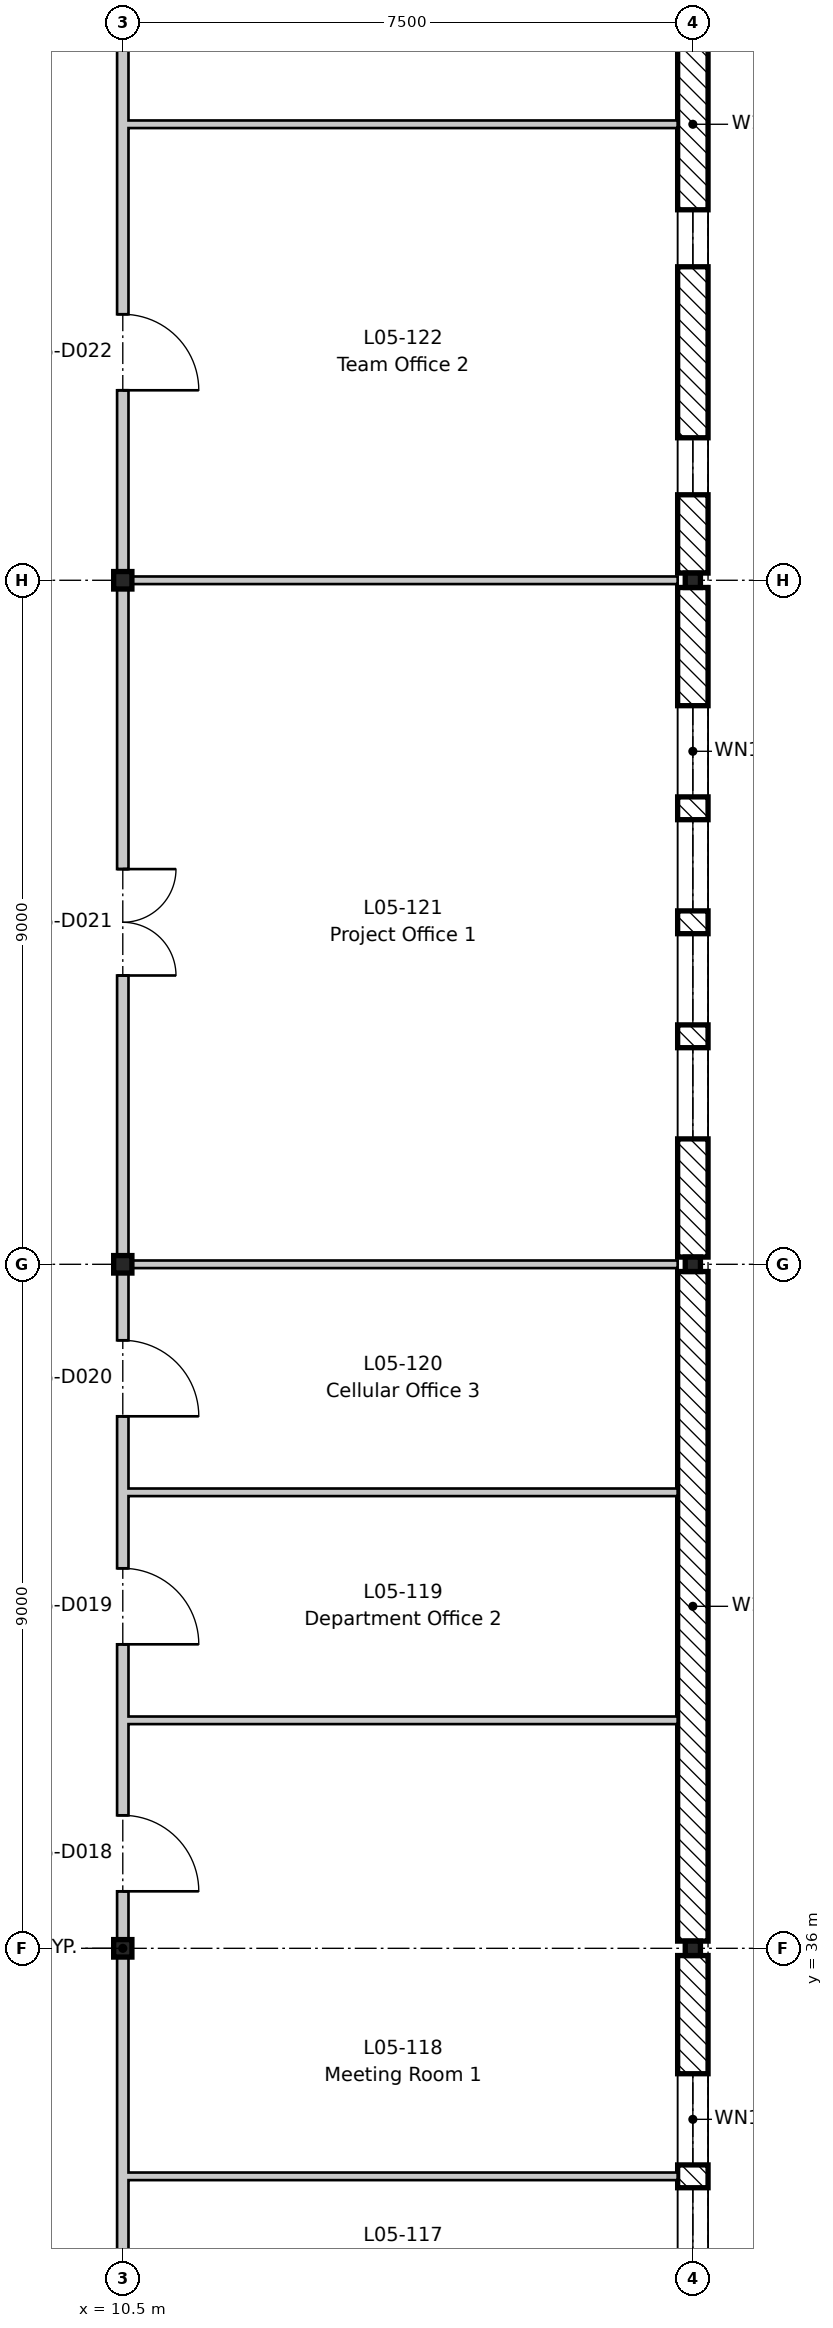
"""IFC4 building model, lengths in metres.
Left out: names, types, materials, properties, quantities, classifications, styles, units other than length and angle.
Written with IfcOpenShell. Run it as: python <this file> out.ifc"""

import sys

from ifc_helpers import new_model, si_unit, direction, frame, frame_2d, origin, origin_2d, place, context, subcontext, project, spatial, rectangle, i_section, extrude, element, fill, save


model = new_model("IFC4")
c1 = context("Model", 3, precision=1e-05, world=origin(), true_north=direction((0.0, 1.0)))
c2 = subcontext(c1, "Body", "Model", "MODEL_VIEW")
j1 = project(units=[si_unit("LENGTHUNIT", "METRE"), si_unit("PLANEANGLEUNIT", "RADIAN")], contexts=[c1])
p1 = place(None, origin())
s1 = spatial("IfcSite", under=j1, at=p1, CompositionType="ELEMENT")
p2 = place(p1, origin())
s2 = spatial("IfcBuilding", under=s1, at=p2, CompositionType="ELEMENT")
p3 = place(p2, frame((0.0, 0.0, 22.8)))
s3 = spatial("IfcBuildingStorey", under=s2, at=p3, CompositionType="ELEMENT", Elevation=22.8)
for number, where, z_axis, x_axis in (
    (1, (10.5, 36.0, -0.2), (0.0, 0.0, 1.0), (1.0, 0.0, 0.0)),
    (2, (10.5, 45.0, -0.2), (0.0, 0.0, 1.0), (1.0, 0.0, 0.0)),
    (3, (10.5, 54.0, -0.2), (0.0, 0.0, 1.0), (1.0, 0.0, 0.0)),
):
    element("IfcColumn", number, at=place(p3, frame(where, z_axis=z_axis, x_axis=x_axis)), inside=s3, PredefinedType="COLUMN", context=c2, shape_type="SweptSolid", body=[
        extrude(i_section(OverallWidth=0.24, OverallDepth=0.23, WebThickness=0.008, FlangeThickness=0.012, FilletRadius=0.021, at=origin_2d()), origin(), (0.0, 0.0, 1.0), 4.15),
    ])
for number, where, z_axis, x_axis in (
    (4, (18.0, 36.0, -0.2), (0.0, 0.0, 1.0), (1.0, 0.0, 0.0)),
    (5, (18.0, 45.0, -0.2), (0.0, 0.0, 1.0), (1.0, 0.0, 0.0)),
    (6, (18.0, 54.0, -0.2), (0.0, 0.0, 1.0), (1.0, 0.0, 0.0)),
):
    element("IfcColumn", number, at=place(p3, frame(where, z_axis=z_axis, x_axis=x_axis)), inside=s3, PredefinedType="COLUMN", context=c2, shape_type="SweptSolid", body=[
        extrude(i_section(OverallWidth=0.2, OverallDepth=0.19, WebThickness=0.007, FlangeThickness=0.01, FilletRadius=0.018, at=origin_2d()), origin(), (0.0, 0.0, 1.0), 4.15),
    ])
p4 = place(p3, frame((18.0, 35.905, 0.0), z_axis=(0.0, 0.0, 1.0), x_axis=(0.0, -1.0, 0.0)))
e7 = element("IfcWall", 7, at=p4, inside=s3, PredefinedType="STANDARD", context=c2, shape_type="SweptSolid", body=[
    extrude(rectangle(XDim=8.81, YDim=0.4, at=frame_2d((4.405, 0.0))), origin(), (0.0, 0.0, 1.0), 3.55),
])
p5 = place(p4, frame((6.055, 0.0, 0.6)))
e8 = element("IfcOpeningElement", 8, at=p5, cuts=e7, PredefinedType="OPENING", context=c2, shape_type="SweptSolid", body=[
    extrude(rectangle(XDim=1.2, YDim=1.8, at=frame_2d((0.6, 0.9))), frame((0.0, 0.21, 0.0), z_axis=(0.0, -1.0, 0.0), x_axis=(1.0, 0.0, 0.0)), (0.0, 0.0, 1.0), 0.42),
])
p6 = place(p4, frame((4.555, 0.0, 0.6)))
e9 = element("IfcOpeningElement", 9, at=p6, cuts=e7, PredefinedType="OPENING", context=c2, shape_type="SweptSolid", body=[
    extrude(rectangle(XDim=1.2, YDim=1.8, at=frame_2d((0.6, 0.9))), frame((0.0, 0.21, 0.0), z_axis=(0.0, -1.0, 0.0), x_axis=(1.0, 0.0, 0.0)), (0.0, 0.0, 1.0), 0.42),
])
p7 = place(p4, frame((3.055, 0.0, 0.6)))
e10 = element("IfcOpeningElement", 10, at=p7, cuts=e7, PredefinedType="OPENING", context=c2, shape_type="SweptSolid", body=[
    extrude(rectangle(XDim=1.2, YDim=1.8, at=frame_2d((0.6, 0.9))), frame((0.0, 0.21, 0.0), z_axis=(0.0, -1.0, 0.0), x_axis=(1.0, 0.0, 0.0)), (0.0, 0.0, 1.0), 0.42),
])
p8 = place(p4, frame((1.555, 0.0, 0.6)))
e11 = element("IfcOpeningElement", 11, at=p8, cuts=e7, PredefinedType="OPENING", context=c2, shape_type="SweptSolid", body=[
    extrude(rectangle(XDim=1.2, YDim=1.8, at=frame_2d((0.6, 0.9))), frame((0.0, 0.21, 0.0), z_axis=(0.0, -1.0, 0.0), x_axis=(1.0, 0.0, 0.0)), (0.0, 0.0, 1.0), 0.42),
])
p9 = place(p3, frame((18.0, 44.905, 0.0), z_axis=(0.0, 0.0, 1.0), x_axis=(0.0, -1.0, 0.0)))
e12 = element("IfcWall", 12, at=p9, inside=s3, PredefinedType="STANDARD", context=c2, shape_type="SweptSolid", body=[
    extrude(rectangle(XDim=8.81, YDim=0.4, at=frame_2d((4.405, 0.0))), origin(), (0.0, 0.0, 1.0), 3.55),
])
p10 = place(p3, frame((18.0, 53.905, 0.0), z_axis=(0.0, 0.0, 1.0), x_axis=(0.0, -1.0, 0.0)))
e13 = element("IfcWall", 13, at=p10, inside=s3, PredefinedType="STANDARD", context=c2, shape_type="SweptSolid", body=[
    extrude(rectangle(XDim=8.81, YDim=0.4, at=frame_2d((4.405, 0.0))), origin(), (0.0, 0.0, 1.0), 3.55),
])
p11 = place(p10, frame((6.055, 0.0, 0.6)))
e14 = element("IfcOpeningElement", 14, at=p11, cuts=e13, PredefinedType="OPENING", context=c2, shape_type="SweptSolid", body=[
    extrude(rectangle(XDim=1.2, YDim=1.8, at=frame_2d((0.6, 0.9))), frame((0.0, 0.21, 0.0), z_axis=(0.0, -1.0, 0.0), x_axis=(1.0, 0.0, 0.0)), (0.0, 0.0, 1.0), 0.42),
])
p12 = place(p10, frame((4.555, 0.0, 0.6)))
e15 = element("IfcOpeningElement", 15, at=p12, cuts=e13, PredefinedType="OPENING", context=c2, shape_type="SweptSolid", body=[
    extrude(rectangle(XDim=1.2, YDim=1.8, at=frame_2d((0.6, 0.9))), frame((0.0, 0.21, 0.0), z_axis=(0.0, -1.0, 0.0), x_axis=(1.0, 0.0, 0.0)), (0.0, 0.0, 1.0), 0.42),
])
p13 = place(p10, frame((3.055, 0.0, 0.6)))
e16 = element("IfcOpeningElement", 16, at=p13, cuts=e13, PredefinedType="OPENING", context=c2, shape_type="SweptSolid", body=[
    extrude(rectangle(XDim=1.2, YDim=1.8, at=frame_2d((0.6, 0.9))), frame((0.0, 0.21, 0.0), z_axis=(0.0, -1.0, 0.0), x_axis=(1.0, 0.0, 0.0)), (0.0, 0.0, 1.0), 0.42),
])
p14 = place(p10, frame((1.555, 0.0, 0.6)))
e17 = element("IfcOpeningElement", 17, at=p14, cuts=e13, PredefinedType="OPENING", context=c2, shape_type="SweptSolid", body=[
    extrude(rectangle(XDim=1.2, YDim=1.8, at=frame_2d((0.6, 0.9))), frame((0.0, 0.21, 0.0), z_axis=(0.0, -1.0, 0.0), x_axis=(1.0, 0.0, 0.0)), (0.0, 0.0, 1.0), 0.42),
])
p15 = place(p3, frame((18.0, 62.905, 0.0), z_axis=(0.0, 0.0, 1.0), x_axis=(0.0, -1.0, 0.0)))
e18 = element("IfcWall", 18, at=p15, inside=s3, PredefinedType="STANDARD", context=c2, shape_type="SweptSolid", body=[
    extrude(rectangle(XDim=8.81, YDim=0.4, at=frame_2d((4.405, 0.0))), origin(), (0.0, 0.0, 1.0), 3.55),
])
p16 = place(p15, frame((7.03, 0.0, 1.5)))
e19 = element("IfcOpeningElement", 19, at=p16, cuts=e18, PredefinedType="OPENING", context=c2, shape_type="SweptSolid", body=[
    extrude(rectangle(XDim=0.75, YDim=1.2, at=frame_2d((0.375, 0.6))), frame((0.0, 0.21, 0.0), z_axis=(0.0, -1.0, 0.0), x_axis=(1.0, 0.0, 0.0)), (0.0, 0.0, 1.0), 0.42),
])
p17 = place(p15, frame((4.03, 0.0, 1.5)))
e20 = element("IfcOpeningElement", 20, at=p17, cuts=e18, PredefinedType="OPENING", context=c2, shape_type="SweptSolid", body=[
    extrude(rectangle(XDim=0.75, YDim=1.2, at=frame_2d((0.375, 0.6))), frame((0.0, 0.21, 0.0), z_axis=(0.0, -1.0, 0.0), x_axis=(1.0, 0.0, 0.0)), (0.0, 0.0, 1.0), 0.42),
])
p18 = place(p15, frame((1.03, 0.0, 1.5)))
e21 = element("IfcOpeningElement", 21, at=p18, cuts=e18, PredefinedType="OPENING", context=c2, shape_type="SweptSolid", body=[
    extrude(rectangle(XDim=0.75, YDim=1.2, at=frame_2d((0.375, 0.6))), frame((0.0, 0.21, 0.0), z_axis=(0.0, -1.0, 0.0), x_axis=(1.0, 0.0, 0.0)), (0.0, 0.0, 1.0), 0.42),
])
for number, where, z_axis, x_axis in (
    (22, (10.575, 33.0, 0.0), (0.0, 0.0, 1.0), (1.0, 0.0, 0.0)),
    (23, (10.575, 39.0, 0.0), (0.0, 0.0, 1.0), (1.0, 0.0, 0.0)),
    (24, (10.575, 42.0, 0.0), (0.0, 0.0, 1.0), (1.0, 0.0, 0.0)),
):
    element("IfcWall", number, at=place(p3, frame(where, z_axis=z_axis, x_axis=x_axis)), inside=s3, PredefinedType="PARTITIONING", context=c2, shape_type="SweptSolid", body=[
        extrude(rectangle(XDim=7.225, YDim=0.1, at=frame_2d((3.613, 0.0))), origin(), (0.0, 0.0, 1.0), 3.95),
    ])
for number, where, z_axis, x_axis in (
    (25, (10.575, 45.0, 0.0), (0.0, 0.0, 1.0), (1.0, 0.0, 0.0)),
    (26, (10.575, 54.0, 0.0), (0.0, 0.0, 1.0), (1.0, 0.0, 0.0)),
):
    element("IfcWall", number, at=place(p3, frame(where, z_axis=z_axis, x_axis=x_axis)), inside=s3, PredefinedType="PARTITIONING", context=c2, shape_type="SweptSolid", body=[
        extrude(rectangle(XDim=7.225, YDim=0.1, at=frame_2d((3.613, 0.0))), origin(), (0.0, 0.0, 1.0), 3.6),
    ])
p19 = place(p3, frame((10.575, 60.0, 0.0), z_axis=(0.0, 0.0, 1.0), x_axis=(1.0, 0.0, 0.0)))
e27 = element("IfcWall", 27, at=p19, inside=s3, PredefinedType="PARTITIONING", context=c2, shape_type="SweptSolid", body=[
    extrude(rectangle(XDim=7.225, YDim=0.1, at=frame_2d((3.613, 0.0))), origin(), (0.0, 0.0, 1.0), 3.95),
])
p20 = place(p3, frame((10.5, -8.8, 0.0), z_axis=(0.0, 0.0, 1.0), x_axis=(0.0, 1.0, 0.0)))
e28 = element("IfcWall", 28, at=p20, inside=s3, PredefinedType="PARTITIONING", context=c2, shape_type="SweptSolid", body=[
    extrude(rectangle(XDim=79.3, YDim=0.15, at=frame_2d((39.65, 0.0))), origin(), (0.0, 0.0, 1.0), 3.43),
])
p21 = place(p20, frame((3.6, 0.0, 0.0)))
e29 = element("IfcOpeningElement", 29, at=p21, cuts=e28, PredefinedType="OPENING", context=c2, shape_type="SweptSolid", body=[
    extrude(rectangle(XDim=1.4, YDim=2.1, at=frame_2d((0.7, 1.05))), frame((0.0, 0.085, 0.0), z_axis=(0.0, -1.0, 0.0), x_axis=(1.0, 0.0, 0.0)), (0.0, 0.0, 1.0), 0.17),
])
p22 = place(p20, frame((9.8, 0.0, 0.0)))
e30 = element("IfcOpeningElement", 30, at=p22, cuts=e28, PredefinedType="OPENING", context=c2, shape_type="SweptSolid", body=[
    extrude(rectangle(XDim=1.0, YDim=2.1, at=frame_2d((0.5, 1.05))), frame((0.0, 0.085, 0.0), z_axis=(0.0, -1.0, 0.0), x_axis=(1.0, 0.0, 0.0)), (0.0, 0.0, 1.0), 0.17),
])
p23 = place(p20, frame((14.3, 0.0, 0.0)))
e31 = element("IfcOpeningElement", 31, at=p23, cuts=e28, PredefinedType="OPENING", context=c2, shape_type="SweptSolid", body=[
    extrude(rectangle(XDim=1.0, YDim=2.1, at=frame_2d((0.5, 1.05))), frame((0.0, 0.085, 0.0), z_axis=(0.0, -1.0, 0.0), x_axis=(1.0, 0.0, 0.0)), (0.0, 0.0, 1.0), 0.17),
])
p24 = place(p20, frame((20.3, 0.0, 0.0)))
e32 = element("IfcOpeningElement", 32, at=p24, cuts=e28, PredefinedType="OPENING", context=c2, shape_type="SweptSolid", body=[
    extrude(rectangle(XDim=1.0, YDim=2.1, at=frame_2d((0.5, 1.05))), frame((0.0, 0.085, 0.0), z_axis=(0.0, -1.0, 0.0), x_axis=(1.0, 0.0, 0.0)), (0.0, 0.0, 1.0), 0.17),
])
p25 = place(p20, frame((27.6, 0.0, 0.0)))
e33 = element("IfcOpeningElement", 33, at=p25, cuts=e28, PredefinedType="OPENING", context=c2, shape_type="SweptSolid", body=[
    extrude(rectangle(XDim=1.4, YDim=2.1, at=frame_2d((0.7, 1.05))), frame((0.0, 0.085, 0.0), z_axis=(0.0, -1.0, 0.0), x_axis=(1.0, 0.0, 0.0)), (0.0, 0.0, 1.0), 0.17),
])
p26 = place(p20, frame((33.8, 0.0, 0.0)))
e34 = element("IfcOpeningElement", 34, at=p26, cuts=e28, PredefinedType="OPENING", context=c2, shape_type="SweptSolid", body=[
    extrude(rectangle(XDim=1.0, YDim=2.1, at=frame_2d((0.5, 1.05))), frame((0.0, 0.085, 0.0), z_axis=(0.0, -1.0, 0.0), x_axis=(1.0, 0.0, 0.0)), (0.0, 0.0, 1.0), 0.17),
])
p27 = place(p20, frame((36.8, 0.0, 0.0)))
e35 = element("IfcOpeningElement", 35, at=p27, cuts=e28, PredefinedType="OPENING", context=c2, shape_type="SweptSolid", body=[
    extrude(rectangle(XDim=1.0, YDim=2.1, at=frame_2d((0.5, 1.05))), frame((0.0, 0.085, 0.0), z_axis=(0.0, -1.0, 0.0), x_axis=(1.0, 0.0, 0.0)), (0.0, 0.0, 1.0), 0.17),
])
p28 = place(p20, frame((39.8, 0.0, 0.0)))
e36 = element("IfcOpeningElement", 36, at=p28, cuts=e28, PredefinedType="OPENING", context=c2, shape_type="SweptSolid", body=[
    extrude(rectangle(XDim=1.0, YDim=2.1, at=frame_2d((0.5, 1.05))), frame((0.0, 0.085, 0.0), z_axis=(0.0, -1.0, 0.0), x_axis=(1.0, 0.0, 0.0)), (0.0, 0.0, 1.0), 0.17),
])
p29 = place(p20, frame((45.55, 0.0, 0.0)))
e37 = element("IfcOpeningElement", 37, at=p29, cuts=e28, PredefinedType="OPENING", context=c2, shape_type="SweptSolid", body=[
    extrude(rectangle(XDim=1.0, YDim=2.1, at=frame_2d((0.5, 1.05))), frame((0.0, 0.085, 0.0), z_axis=(0.0, -1.0, 0.0), x_axis=(1.0, 0.0, 0.0)), (0.0, 0.0, 1.0), 0.17),
])
p30 = place(p20, frame((48.8, 0.0, 0.0)))
e38 = element("IfcOpeningElement", 38, at=p30, cuts=e28, PredefinedType="OPENING", context=c2, shape_type="SweptSolid", body=[
    extrude(rectangle(XDim=1.0, YDim=2.1, at=frame_2d((0.5, 1.05))), frame((0.0, 0.085, 0.0), z_axis=(0.0, -1.0, 0.0), x_axis=(1.0, 0.0, 0.0)), (0.0, 0.0, 1.0), 0.17),
])
p31 = place(p20, frame((51.8, 0.0, 0.0)))
e39 = element("IfcOpeningElement", 39, at=p31, cuts=e28, PredefinedType="OPENING", context=c2, shape_type="SweptSolid", body=[
    extrude(rectangle(XDim=1.0, YDim=2.1, at=frame_2d((0.5, 1.05))), frame((0.0, 0.085, 0.0), z_axis=(0.0, -1.0, 0.0), x_axis=(1.0, 0.0, 0.0)), (0.0, 0.0, 1.0), 0.17),
])
p32 = place(p20, frame((57.6, 0.0, 0.0)))
e40 = element("IfcOpeningElement", 40, at=p32, cuts=e28, PredefinedType="OPENING", context=c2, shape_type="SweptSolid", body=[
    extrude(rectangle(XDim=1.4, YDim=2.1, at=frame_2d((0.7, 1.05))), frame((0.0, 0.085, 0.0), z_axis=(0.0, -1.0, 0.0), x_axis=(1.0, 0.0, 0.0)), (0.0, 0.0, 1.0), 0.17),
])
p33 = place(p20, frame((65.3, 0.0, 0.0)))
e41 = element("IfcOpeningElement", 41, at=p33, cuts=e28, PredefinedType="OPENING", context=c2, shape_type="SweptSolid", body=[
    extrude(rectangle(XDim=1.0, YDim=2.1, at=frame_2d((0.5, 1.05))), frame((0.0, 0.085, 0.0), z_axis=(0.0, -1.0, 0.0), x_axis=(1.0, 0.0, 0.0)), (0.0, 0.0, 1.0), 0.17),
])
p34 = place(p20, frame((69.8, 0.0, 0.0)))
e42 = element("IfcOpeningElement", 42, at=p34, cuts=e28, PredefinedType="OPENING", context=c2, shape_type="SweptSolid", body=[
    extrude(rectangle(XDim=1.0, YDim=2.1, at=frame_2d((0.5, 1.05))), frame((0.0, 0.085, 0.0), z_axis=(0.0, -1.0, 0.0), x_axis=(1.0, 0.0, 0.0)), (0.0, 0.0, 1.0), 0.17),
])
p35 = place(p20, frame((72.8, 0.0, 0.0)))
e43 = element("IfcOpeningElement", 43, at=p35, cuts=e28, PredefinedType="OPENING", context=c2, shape_type="SweptSolid", body=[
    extrude(rectangle(XDim=1.0, YDim=2.1, at=frame_2d((0.5, 1.05))), frame((0.0, 0.085, 0.0), z_axis=(0.0, -1.0, 0.0), x_axis=(1.0, 0.0, 0.0)), (0.0, 0.0, 1.0), 0.17),
])
p36 = place(p7, origin())
e44 = element("IfcWindow", 44, at=p36, inside=s3, PartitioningType="SINGLE_PANEL", PredefinedType="WINDOW", context=c2, shape_type="SweptSolid", body=[
    extrude(rectangle(XDim=1.2, YDim=1.8, at=frame_2d((0.6, 0.9))), frame((0.0, 0.03, 0.0), z_axis=(0.0, -1.0, 0.0), x_axis=(1.0, 0.0, 0.0)), (0.0, 0.0, 1.0), 0.06),
])
fill(e10, e44)
p37 = place(p8, origin())
e45 = element("IfcWindow", 45, at=p37, inside=s3, PartitioningType="SINGLE_PANEL", PredefinedType="WINDOW", context=c2, shape_type="SweptSolid", body=[
    extrude(rectangle(XDim=1.2, YDim=1.8, at=frame_2d((0.6, 0.9))), frame((0.0, 0.03, 0.0), z_axis=(0.0, -1.0, 0.0), x_axis=(1.0, 0.0, 0.0)), (0.0, 0.0, 1.0), 0.06),
])
fill(e11, e45)
p38 = place(p11, origin())
e46 = element("IfcWindow", 46, at=p38, inside=s3, PartitioningType="SINGLE_PANEL", PredefinedType="WINDOW", context=c2, shape_type="SweptSolid", body=[
    extrude(rectangle(XDim=1.2, YDim=1.8, at=frame_2d((0.6, 0.9))), frame((0.0, 0.03, 0.0), z_axis=(0.0, -1.0, 0.0), x_axis=(1.0, 0.0, 0.0)), (0.0, 0.0, 1.0), 0.06),
])
fill(e14, e46)
p39 = place(p12, origin())
e47 = element("IfcWindow", 47, at=p39, inside=s3, PartitioningType="SINGLE_PANEL", PredefinedType="WINDOW", context=c2, shape_type="SweptSolid", body=[
    extrude(rectangle(XDim=1.2, YDim=1.8, at=frame_2d((0.6, 0.9))), frame((0.0, 0.03, 0.0), z_axis=(0.0, -1.0, 0.0), x_axis=(1.0, 0.0, 0.0)), (0.0, 0.0, 1.0), 0.06),
])
fill(e15, e47)
p40 = place(p13, origin())
e48 = element("IfcWindow", 48, at=p40, inside=s3, PartitioningType="SINGLE_PANEL", PredefinedType="WINDOW", context=c2, shape_type="SweptSolid", body=[
    extrude(rectangle(XDim=1.2, YDim=1.8, at=frame_2d((0.6, 0.9))), frame((0.0, 0.03, 0.0), z_axis=(0.0, -1.0, 0.0), x_axis=(1.0, 0.0, 0.0)), (0.0, 0.0, 1.0), 0.06),
])
fill(e16, e48)
p41 = place(p14, origin())
e49 = element("IfcWindow", 49, at=p41, inside=s3, PartitioningType="SINGLE_PANEL", PredefinedType="WINDOW", context=c2, shape_type="SweptSolid", body=[
    extrude(rectangle(XDim=1.2, YDim=1.8, at=frame_2d((0.6, 0.9))), frame((0.0, 0.03, 0.0), z_axis=(0.0, -1.0, 0.0), x_axis=(1.0, 0.0, 0.0)), (0.0, 0.0, 1.0), 0.06),
])
fill(e17, e49)
p42 = place(p16, origin())
e50 = element("IfcWindow", 50, at=p42, inside=s3, PartitioningType="SINGLE_PANEL", PredefinedType="WINDOW", context=c2, shape_type="SweptSolid", body=[
    extrude(rectangle(XDim=0.75, YDim=1.2, at=frame_2d((0.375, 0.6))), frame((0.0, -0.12, 0.0), z_axis=(0.0, -1.0, 0.0), x_axis=(1.0, 0.0, 0.0)), (0.0, 0.0, 1.0), 0.06),
])
fill(e19, e50)
p43 = place(p17, origin())
e51 = element("IfcWindow", 51, at=p43, inside=s3, PartitioningType="SINGLE_PANEL", PredefinedType="WINDOW", context=c2, shape_type="SweptSolid", body=[
    extrude(rectangle(XDim=0.75, YDim=1.2, at=frame_2d((0.375, 0.6))), frame((0.0, -0.12, 0.0), z_axis=(0.0, -1.0, 0.0), x_axis=(1.0, 0.0, 0.0)), (0.0, 0.0, 1.0), 0.06),
])
fill(e20, e51)
p44 = place(p29, frame((1.0, 0.0, 0.0), z_axis=(0.0, 0.0, 1.0), x_axis=(-1.0, 0.0, 0.0)))
e52 = element("IfcDoor", 52, at=p44, inside=s3, OperationType="SINGLE_SWING_RIGHT", PredefinedType="DOOR", context=c2, shape_type="SweptSolid", body=[
    extrude(rectangle(XDim=1.0, YDim=2.1, at=frame_2d((0.5, 1.05))), frame((0.0, 0.025, 0.0), z_axis=(0.0, -1.0, 0.0), x_axis=(1.0, 0.0, 0.0)), (0.0, 0.0, 1.0), 0.05),
])
fill(e37, e52)
p45 = place(p30, frame((1.0, 0.0, 0.0), z_axis=(0.0, 0.0, 1.0), x_axis=(-1.0, 0.0, 0.0)))
e53 = element("IfcDoor", 53, at=p45, inside=s3, OperationType="SINGLE_SWING_RIGHT", PredefinedType="DOOR", context=c2, shape_type="SweptSolid", body=[
    extrude(rectangle(XDim=1.0, YDim=2.1, at=frame_2d((0.5, 1.05))), frame((0.0, 0.025, 0.0), z_axis=(0.0, -1.0, 0.0), x_axis=(1.0, 0.0, 0.0)), (0.0, 0.0, 1.0), 0.05),
])
fill(e38, e53)
p46 = place(p31, frame((1.0, 0.0, 0.0), z_axis=(0.0, 0.0, 1.0), x_axis=(-1.0, 0.0, 0.0)))
e54 = element("IfcDoor", 54, at=p46, inside=s3, OperationType="SINGLE_SWING_RIGHT", PredefinedType="DOOR", context=c2, shape_type="SweptSolid", body=[
    extrude(rectangle(XDim=1.0, YDim=2.1, at=frame_2d((0.5, 1.05))), frame((0.0, 0.025, 0.0), z_axis=(0.0, -1.0, 0.0), x_axis=(1.0, 0.0, 0.0)), (0.0, 0.0, 1.0), 0.05),
])
fill(e39, e54)
p47 = place(p32, frame((1.4, 0.0, 0.0), z_axis=(0.0, 0.0, 1.0), x_axis=(-1.0, 0.0, 0.0)))
e55 = element("IfcDoor", 55, at=p47, inside=s3, OperationType="DOUBLE_DOOR_SINGLE_SWING", PredefinedType="DOOR", context=c2, shape_type="SweptSolid", body=[
    extrude(rectangle(XDim=1.4, YDim=2.1, at=frame_2d((0.7, 1.05))), frame((0.0, 0.025, 0.0), z_axis=(0.0, -1.0, 0.0), x_axis=(1.0, 0.0, 0.0)), (0.0, 0.0, 1.0), 0.05),
])
fill(e40, e55)
p48 = place(p33, frame((1.0, 0.0, 0.0), z_axis=(0.0, 0.0, 1.0), x_axis=(-1.0, 0.0, 0.0)))
e56 = element("IfcDoor", 56, at=p48, inside=s3, OperationType="SINGLE_SWING_RIGHT", PredefinedType="DOOR", context=c2, shape_type="SweptSolid", body=[
    extrude(rectangle(XDim=1.0, YDim=2.1, at=frame_2d((0.5, 1.05))), frame((0.0, 0.025, 0.0), z_axis=(0.0, -1.0, 0.0), x_axis=(1.0, 0.0, 0.0)), (0.0, 0.0, 1.0), 0.05),
])
fill(e41, e56)
save(model, sys.argv[1])
